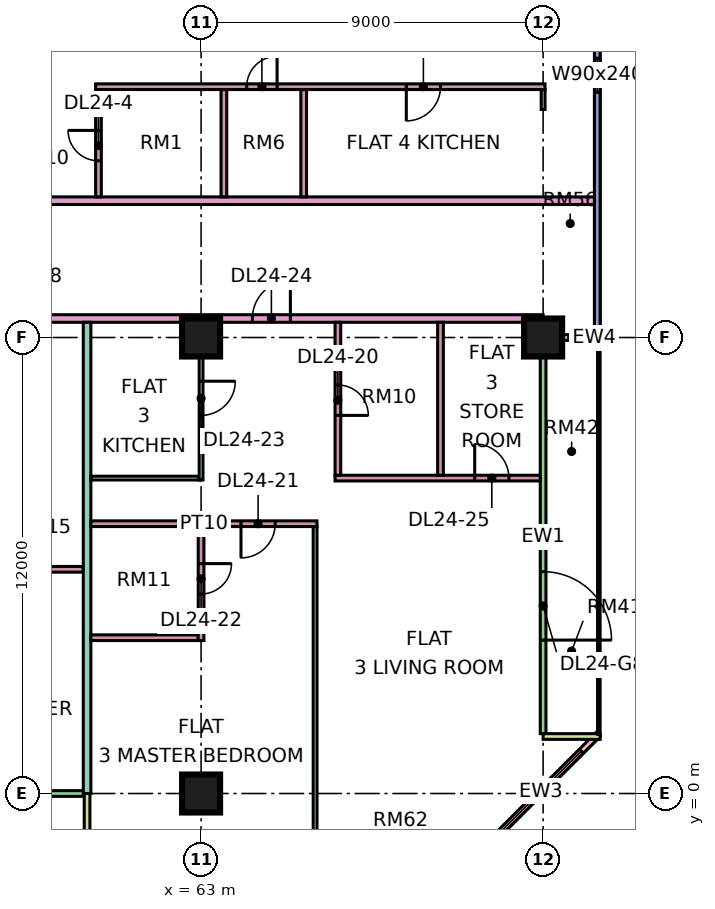
"""IFC4 building model, lengths in metres.
Left out: names, types, materials, properties, quantities, classifications, styles, units other than length and angle.
Written with IfcOpenShell. Run it as: python <this file> out.ifc"""

import sys

from ifc_helpers import new_model, si_unit, direction, frame, frame_2d, origin, origin_2d, place, context, subcontext, project, spatial, rectangle, extrude, element, fill, save


model = new_model("IFC4")
c1 = context("Model", 3, precision=1e-05, world=origin(), true_north=direction((0.0, 1.0)))
c2 = subcontext(c1, "Body", "Model", "MODEL_VIEW")
j1 = project(units=[si_unit("LENGTHUNIT", "METRE"), si_unit("PLANEANGLEUNIT", "RADIAN")], contexts=[c1])
p1 = place(None, origin())
s1 = spatial("IfcSite", under=j1, at=p1, CompositionType="ELEMENT")
p2 = place(p1, origin())
s2 = spatial("IfcBuilding", under=s1, at=p2, CompositionType="ELEMENT")
p3 = place(p2, frame((0.0, 0.0, 106.9)))
s3 = spatial("IfcBuildingStorey", under=s2, at=p3, CompositionType="ELEMENT", Elevation=106.9)
for number, where, z_axis, x_axis in (
    (1, (63.0, 0.0, 0.0), (0.0, 0.0, 1.0), (1.0, 0.0, 0.0)),
    (2, (63.0, 12.0, 0.0), (0.0, 0.0, 1.0), (1.0, 0.0, 0.0)),
    (3, (72.0, 12.0, 0.0), (0.0, 0.0, 1.0), (1.0, 0.0, 0.0)),
):
    element("IfcColumn", number, at=place(p3, frame(where, z_axis=z_axis, x_axis=x_axis)), inside=s3, PredefinedType="COLUMN", context=c2, shape_type="SweptSolid", body=[
        extrude(rectangle(XDim=1.0, YDim=1.0, at=origin_2d()), origin(), (0.0, 0.0, 1.0), 3.75),
    ])
p4 = place(p3, frame((48.075, 0.0, 0.0), z_axis=(0.0, 0.0, 1.0), x_axis=(1.0, 0.0, 0.0)))
e4 = element("IfcWall", 4, at=p4, inside=s3, PredefinedType="SOLIDWALL", context=c2, shape_type="SweptSolid", body=[
    extrude(rectangle(XDim=11.85, YDim=0.15, at=frame_2d((5.925, 0.0))), origin(), (0.0, 0.0, 1.0), 3.35),
])
p5 = place(p4, frame((0.562, 0.0, 0.45)))
e5 = element("IfcOpeningElement", 5, at=p5, cuts=e4, PredefinedType="OPENING", context=c2, shape_type="SweptSolid", body=[
    extrude(rectangle(XDim=1.8, YDim=2.4, at=frame_2d((0.9, 1.2))), frame((0.0, 0.085, 0.0), z_axis=(0.0, -1.0, 0.0), x_axis=(1.0, 0.0, 0.0)), (0.0, 0.0, 1.0), 0.17),
])
p6 = place(p4, frame((3.525, 0.0, 0.0)))
e6 = element("IfcOpeningElement", 6, at=p6, cuts=e4, PredefinedType="OPENING", context=c2, shape_type="SweptSolid", body=[
    extrude(rectangle(XDim=1.2, YDim=2.4, at=frame_2d((0.6, 1.2))), frame((0.0, 0.085, 0.0), z_axis=(0.0, -1.0, 0.0), x_axis=(1.0, 0.0, 0.0)), (0.0, 0.0, 1.0), 0.17),
])
p7 = place(p4, frame((7.688, 0.0, 0.45)))
e7 = element("IfcOpeningElement", 7, at=p7, cuts=e4, PredefinedType="OPENING", context=c2, shape_type="SweptSolid", body=[
    extrude(rectangle(XDim=3.0, YDim=2.4, at=frame_2d((1.5, 1.2))), frame((0.0, 0.085, 0.0), z_axis=(0.0, -1.0, 0.0), x_axis=(1.0, 0.0, 0.0)), (0.0, 0.0, 1.0), 0.17),
])
p8 = place(p3, frame((60.0, -1.5, 0.0), z_axis=(0.0, 0.0, 1.0), x_axis=(0.0, 1.0, 0.0)))
e8 = element("IfcWall", 8, at=p8, inside=s3, PredefinedType="SOLIDWALL", context=c2, shape_type="SweptSolid", body=[
    extrude(rectangle(XDim=1.5, YDim=0.15, at=frame_2d((0.75, 0.0))), origin(), (0.0, 0.0, 1.0), 3.35),
])
p9 = place(p3, frame((70.447, -1.447, 0.0), z_axis=(0.0, 0.0, 1.0), x_axis=(0.707106781187, 0.707106781187, 0.0)))
e9 = element("IfcWall", 9, at=p9, inside=s3, PredefinedType="SOLIDWALL", context=c2, shape_type="SweptSolid", body=[
    extrude(rectangle(XDim=4.243, YDim=0.15, at=frame_2d((2.121, 0.0))), origin(), (0.0, 0.0, 1.0), 3.35),
])
p10 = place(p9, frame((0.621, 0.0, 0.45)))
e10 = element("IfcOpeningElement", 10, at=p10, cuts=e9, PredefinedType="OPENING", context=c2, shape_type="SweptSolid", body=[
    extrude(rectangle(XDim=3.0, YDim=2.4, at=frame_2d((1.5, 1.2))), frame((0.0, 0.085, 0.0), z_axis=(0.0, -1.0, 0.0), x_axis=(1.0, 0.0, 0.0)), (0.0, 0.0, 1.0), 0.17),
])
p11 = place(p3, frame((72.0, 1.575, 0.0), z_axis=(0.0, 0.0, 1.0), x_axis=(0.0, 1.0, 0.0)))
e11 = element("IfcWall", 11, at=p11, inside=s3, PredefinedType="SOLIDWALL", context=c2, shape_type="SweptSolid", body=[
    extrude(rectangle(XDim=10.35, YDim=0.15, at=frame_2d((5.175, 0.0))), origin(), (0.0, 0.0, 1.0), 3.35),
])
p12 = place(p11, frame((2.462, 0.0, 0.0)))
e12 = element("IfcOpeningElement", 12, at=p12, cuts=e11, PredefinedType="OPENING", context=c2, shape_type="SweptSolid", body=[
    extrude(rectangle(XDim=1.8, YDim=2.4, at=frame_2d((0.9, 1.2))), frame((0.0, 0.085, 0.0), z_axis=(0.0, -1.0, 0.0), x_axis=(1.0, 0.0, 0.0)), (0.0, 0.0, 1.0), 0.17),
])
for number, where, z_axis, x_axis in (
    (13, (73.5, 1.5, 0.0), (0.0, 0.0, 1.0), (-1.0, 0.0, 0.0)),
    (14, (73.5, 12.0, 0.0), (0.0, 0.0, 1.0), (-1.0, 0.0, 0.0)),
):
    element("IfcWall", number, at=place(p3, frame(where, z_axis=z_axis, x_axis=x_axis)), inside=s3, PredefinedType="SOLIDWALL", context=c2, shape_type="SweptSolid", body=[
        extrude(rectangle(XDim=1.5, YDim=0.15, at=frame_2d((0.75, 0.0))), origin(), (0.0, 0.0, 1.0), 3.35),
    ])
p13 = place(p3, frame((73.425, 12.075, 0.0), z_axis=(0.0, 0.0, 1.0), x_axis=(0.0, 1.0, 0.0)))
e15 = element("IfcWall", 15, at=p13, inside=s3, PredefinedType="SOLIDWALL", context=c2, shape_type="SweptSolid", body=[
    extrude(rectangle(XDim=10.425, YDim=0.15, at=frame_2d((5.212, 0.0))), origin(), (0.0, 0.0, 1.0), 3.35),
])
p14 = place(p13, frame((6.375, 0.0, 0.45)))
e16 = element("IfcOpeningElement", 16, at=p14, cuts=e15, PredefinedType="OPENING", context=c2, shape_type="SweptSolid", body=[
    extrude(rectangle(XDim=0.9, YDim=2.4, at=frame_2d((0.45, 1.2))), frame((0.0, 0.085, 0.0), z_axis=(0.0, -1.0, 0.0), x_axis=(1.0, 0.0, 0.0)), (0.0, 0.0, 1.0), 0.17),
])
p15 = place(p13, frame((8.175, 0.0, 0.45)))
e17 = element("IfcOpeningElement", 17, at=p15, cuts=e15, PredefinedType="OPENING", context=c2, shape_type="SweptSolid", body=[
    extrude(rectangle(XDim=1.8, YDim=2.4, at=frame_2d((0.9, 1.2))), frame((0.0, 0.085, 0.0), z_axis=(0.0, -1.0, 0.0), x_axis=(1.0, 0.0, 0.0)), (0.0, 0.0, 1.0), 0.17),
])
p16 = place(p3, frame((40.65, 12.5, 0.0), z_axis=(0.0, 0.0, 1.0), x_axis=(1.0, 0.0, 0.0)))
e18 = element("IfcWall", 18, at=p16, inside=s3, PredefinedType="PARTITIONING", context=c2, shape_type="SweptSolid", body=[
    extrude(rectangle(XDim=31.35, YDim=0.2, at=frame_2d((15.675, 0.0))), origin(), (0.0, 0.0, 1.0), 3.35),
])
p17 = place(p16, frame((17.1, 0.0, 0.0)))
e19 = element("IfcOpeningElement", 19, at=p17, cuts=e18, PredefinedType="OPENING", context=c2, shape_type="SweptSolid", body=[
    extrude(rectangle(XDim=1.0, YDim=2.1, at=frame_2d((0.5, 1.05))), frame((0.0, 0.11, 0.0), z_axis=(0.0, -1.0, 0.0), x_axis=(1.0, 0.0, 0.0)), (0.0, 0.0, 1.0), 0.22),
])
p18 = place(p16, frame((23.7, 0.0, 0.0)))
e20 = element("IfcOpeningElement", 20, at=p18, cuts=e18, PredefinedType="OPENING", context=c2, shape_type="SweptSolid", body=[
    extrude(rectangle(XDim=1.0, YDim=2.1, at=frame_2d((0.5, 1.05))), frame((0.0, 0.11, 0.0), z_axis=(0.0, -1.0, 0.0), x_axis=(1.0, 0.0, 0.0)), (0.0, 0.0, 1.0), 0.22),
])
p19 = place(p16, frame((1.05, 0.0, 0.0)))
e21 = element("IfcOpeningElement", 21, at=p19, cuts=e18, PredefinedType="OPENING", context=c2, shape_type="SweptSolid", body=[
    extrude(rectangle(XDim=1.0, YDim=2.1, at=frame_2d((0.5, 1.05))), frame((0.0, 0.11, 0.0), z_axis=(0.0, -1.0, 0.0), x_axis=(1.0, 0.0, 0.0)), (0.0, 0.0, 1.0), 0.22),
])
p20 = place(p3, frame((50.95, 5.9, 0.0), z_axis=(0.0, 0.0, 1.0), x_axis=(1.0, 0.0, 0.0)))
e22 = element("IfcWall", 22, at=p20, inside=s3, PredefinedType="PARTITIONING", context=c2, shape_type="SweptSolid", body=[
    extrude(rectangle(XDim=8.95, YDim=0.15, at=frame_2d((4.475, 0.0))), origin(), (0.0, 0.0, 1.0), 3.35),
])
p21 = place(p20, frame((1.1, 0.0, 0.0)))
e23 = element("IfcOpeningElement", 23, at=p21, cuts=e22, PredefinedType="OPENING", context=c2, shape_type="SweptSolid", body=[
    extrude(rectangle(XDim=0.9, YDim=2.1, at=frame_2d((0.45, 1.05))), frame((0.0, 0.085, 0.0), z_axis=(0.0, -1.0, 0.0), x_axis=(1.0, 0.0, 0.0)), (0.0, 0.0, 1.0), 0.17),
])
p22 = place(p20, frame((7.1, 0.0, 0.0)))
e24 = element("IfcOpeningElement", 24, at=p22, cuts=e22, PredefinedType="OPENING", context=c2, shape_type="SweptSolid", body=[
    extrude(rectangle(XDim=0.9, YDim=2.1, at=frame_2d((0.45, 1.05))), frame((0.0, 0.085, 0.0), z_axis=(0.0, -1.0, 0.0), x_axis=(1.0, 0.0, 0.0)), (0.0, 0.0, 1.0), 0.17),
])
p23 = place(p3, frame((51.225, 15.6, 0.0), z_axis=(0.0, 0.0, 1.0), x_axis=(1.0, 0.0, 0.0)))
e25 = element("IfcWall", 25, at=p23, inside=s3, PredefinedType="PARTITIONING", context=c2, shape_type="SweptSolid", body=[
    extrude(rectangle(XDim=22.125, YDim=0.2, at=frame_2d((11.062, 0.0))), origin(), (0.0, 0.0, 1.0), 3.35),
])
p24 = place(p23, frame((6.725, 0.0, 0.0)))
e26 = element("IfcOpeningElement", 26, at=p24, cuts=e25, PredefinedType="OPENING", context=c2, shape_type="SweptSolid", body=[
    extrude(rectangle(XDim=1.0, YDim=2.1, at=frame_2d((0.5, 1.05))), frame((0.0, 0.11, 0.0), z_axis=(0.0, -1.0, 0.0), x_axis=(1.0, 0.0, 0.0)), (0.0, 0.0, 1.0), 0.22),
])
p25 = place(p23, frame((0.875, 0.0, 0.0)))
e27 = element("IfcOpeningElement", 27, at=p25, cuts=e25, PredefinedType="OPENING", context=c2, shape_type="SweptSolid", body=[
    extrude(rectangle(XDim=1.0, YDim=2.1, at=frame_2d((0.5, 1.05))), frame((0.0, 0.11, 0.0), z_axis=(0.0, -1.0, 0.0), x_axis=(1.0, 0.0, 0.0)), (0.0, 0.0, 1.0), 0.22),
])
p26 = place(p3, frame((60.0, 0.0, 0.0), z_axis=(0.0, 0.0, 1.0), x_axis=(0.0, 1.0, 0.0)))
e28 = element("IfcWall", 28, at=p26, inside=s3, PredefinedType="PARTITIONING", context=c2, shape_type="SweptSolid", body=[
    extrude(rectangle(XDim=12.4, YDim=0.2, at=frame_2d((6.2, 0.0))), origin(), (0.0, 0.0, 1.0), 3.35),
])
p27 = place(p3, frame((60.1, 4.1, 0.0), z_axis=(0.0, 0.0, 1.0), x_axis=(1.0, 0.0, 0.0)))
e29 = element("IfcWall", 29, at=p27, inside=s3, PredefinedType="PARTITIONING", context=c2, shape_type="SweptSolid", body=[
    extrude(rectangle(XDim=2.825, YDim=0.15, at=frame_2d((1.413, 0.0))), origin(), (0.0, 0.0, 1.0), 3.35),
])
p28 = place(p3, frame((60.1, 7.1, 0.0), z_axis=(0.0, 0.0, 1.0), x_axis=(1.0, 0.0, 0.0)))
e30 = element("IfcWall", 30, at=p28, inside=s3, PredefinedType="PARTITIONING", context=c2, shape_type="SweptSolid", body=[
    extrude(rectangle(XDim=5.95, YDim=0.15, at=frame_2d((2.975, 0.0))), origin(), (0.0, 0.0, 1.0), 3.35),
])
p29 = place(p28, frame((3.95, 0.0, 0.0)))
e31 = element("IfcOpeningElement", 31, at=p29, cuts=e30, PredefinedType="OPENING", context=c2, shape_type="SweptSolid", body=[
    extrude(rectangle(XDim=0.9, YDim=2.1, at=frame_2d((0.45, 1.05))), frame((0.0, 0.085, 0.0), z_axis=(0.0, -1.0, 0.0), x_axis=(1.0, 0.0, 0.0)), (0.0, 0.0, 1.0), 0.17),
])
p30 = place(p3, frame((60.1, 8.3, 0.0), z_axis=(0.0, 0.0, 1.0), x_axis=(1.0, 0.0, 0.0)))
e32 = element("IfcWall", 32, at=p30, inside=s3, PredefinedType="PARTITIONING", context=c2, shape_type="SweptSolid", body=[
    extrude(rectangle(XDim=2.85, YDim=0.1, at=frame_2d((1.425, 0.0))), origin(), (0.0, 0.0, 1.0), 3.35),
])
p31 = place(p3, frame((60.225, 18.6, 0.0), z_axis=(0.0, 0.0, 1.0), x_axis=(1.0, 0.0, 0.0)))
e33 = element("IfcWall", 33, at=p31, inside=s3, PredefinedType="PARTITIONING", context=c2, shape_type="SweptSolid", body=[
    extrude(rectangle(XDim=11.825, YDim=0.15, at=frame_2d((5.913, 0.0))), origin(), (0.0, 0.0, 1.0), 3.35),
])
p32 = place(p31, frame((8.175, 0.0, 0.0)))
e34 = element("IfcOpeningElement", 34, at=p32, cuts=e33, PredefinedType="OPENING", context=c2, shape_type="SweptSolid", body=[
    extrude(rectangle(XDim=0.9, YDim=2.1, at=frame_2d((0.45, 1.05))), frame((0.0, 0.085, 0.0), z_axis=(0.0, -1.0, 0.0), x_axis=(1.0, 0.0, 0.0)), (0.0, 0.0, 1.0), 0.17),
])
p33 = place(p31, frame((3.975, 0.0, 0.0)))
e35 = element("IfcOpeningElement", 35, at=p33, cuts=e33, PredefinedType="OPENING", context=c2, shape_type="SweptSolid", body=[
    extrude(rectangle(XDim=0.8, YDim=2.1, at=frame_2d((0.4, 1.05))), frame((0.0, 0.085, 0.0), z_axis=(0.0, -1.0, 0.0), x_axis=(1.0, 0.0, 0.0)), (0.0, 0.0, 1.0), 0.17),
])
p34 = place(p3, frame((60.3, 15.7, 0.0), z_axis=(0.0, 0.0, 1.0), x_axis=(0.0, 1.0, 0.0)))
e36 = element("IfcWall", 36, at=p34, inside=s3, PredefinedType="PARTITIONING", context=c2, shape_type="SweptSolid", body=[
    extrude(rectangle(XDim=2.825, YDim=0.15, at=frame_2d((1.413, 0.0))), origin(), (0.0, 0.0, 1.0), 3.35),
])
p35 = place(p34, frame((0.95, 0.0, 0.0)))
e37 = element("IfcOpeningElement", 37, at=p35, cuts=e36, PredefinedType="OPENING", context=c2, shape_type="SweptSolid", body=[
    extrude(rectangle(XDim=0.8, YDim=2.1, at=frame_2d((0.4, 1.05))), frame((0.0, 0.085, 0.0), z_axis=(0.0, -1.0, 0.0), x_axis=(1.0, 0.0, 0.0)), (0.0, 0.0, 1.0), 0.17),
])
p36 = place(p3, frame((63.0, 4.025, 0.0), z_axis=(0.0, 0.0, 1.0), x_axis=(0.0, 1.0, 0.0)))
e38 = element("IfcWall", 38, at=p36, inside=s3, PredefinedType="PARTITIONING", context=c2, shape_type="SweptSolid", body=[
    extrude(rectangle(XDim=3.0, YDim=0.15, at=frame_2d((1.5, 0.0))), origin(), (0.0, 0.0, 1.0), 3.35),
])
p37 = place(p36, frame((1.225, 0.0, 0.0)))
e39 = element("IfcOpeningElement", 39, at=p37, cuts=e38, PredefinedType="OPENING", context=c2, shape_type="SweptSolid", body=[
    extrude(rectangle(XDim=0.8, YDim=2.1, at=frame_2d((0.4, 1.05))), frame((0.0, 0.085, 0.0), z_axis=(0.0, -1.0, 0.0), x_axis=(1.0, 0.0, 0.0)), (0.0, 0.0, 1.0), 0.17),
])
p38 = place(p3, frame((63.0, 8.25, 0.0), z_axis=(0.0, 0.0, 1.0), x_axis=(0.0, 1.0, 0.0)))
e40 = element("IfcWall", 40, at=p38, inside=s3, PredefinedType="PARTITIONING", context=c2, shape_type="SweptSolid", body=[
    extrude(rectangle(XDim=4.15, YDim=0.1, at=frame_2d((2.075, 0.0))), origin(), (0.0, 0.0, 1.0), 3.35),
])
p39 = place(p38, frame((1.7, 0.0, 0.0)))
e41 = element("IfcOpeningElement", 41, at=p39, cuts=e40, PredefinedType="OPENING", context=c2, shape_type="SweptSolid", body=[
    extrude(rectangle(XDim=0.9, YDim=2.1, at=frame_2d((0.45, 1.05))), frame((0.0, 0.06, 0.0), z_axis=(0.0, -1.0, 0.0), x_axis=(1.0, 0.0, 0.0)), (0.0, 0.0, 1.0), 0.12),
])
for number, where, z_axis, x_axis in (
    (42, (63.6, 15.7, 0.0), (0.0, 0.0, 1.0), (0.0, 1.0, 0.0)),
    (43, (65.7, 15.7, 0.0), (0.0, 0.0, 1.0), (0.0, 1.0, 0.0)),
):
    element("IfcWall", number, at=place(p3, frame(where, z_axis=z_axis, x_axis=x_axis)), inside=s3, PredefinedType="PARTITIONING", context=c2, shape_type="SweptSolid", body=[
        extrude(rectangle(XDim=2.825, YDim=0.15, at=frame_2d((1.413, 0.0))), origin(), (0.0, 0.0, 1.0), 3.35),
    ])
p40 = place(p3, frame((66.0, -1.35, 0.0), z_axis=(0.0, 0.0, 1.0), x_axis=(0.0, 1.0, 0.0)))
e44 = element("IfcWall", 44, at=p40, inside=s3, PredefinedType="PARTITIONING", context=c2, shape_type="SweptSolid", body=[
    extrude(rectangle(XDim=8.375, YDim=0.1, at=frame_2d((4.188, 0.0))), origin(), (0.0, 0.0, 1.0), 3.35),
])
p41 = place(p3, frame((66.525, 8.3, 0.0), z_axis=(0.0, 0.0, 1.0), x_axis=(1.0, 0.0, 0.0)))
e45 = element("IfcWall", 45, at=p41, inside=s3, PredefinedType="PARTITIONING", context=c2, shape_type="SweptSolid", body=[
    extrude(rectangle(XDim=5.401, YDim=0.15, at=frame_2d((2.701, 0.0))), origin(), (0.0, 0.0, 1.0), 3.35),
])
p42 = place(p41, frame((3.675, 0.0, 0.0)))
e46 = element("IfcOpeningElement", 46, at=p42, cuts=e45, PredefinedType="OPENING", context=c2, shape_type="SweptSolid", body=[
    extrude(rectangle(XDim=0.9, YDim=2.1, at=frame_2d((0.45, 1.05))), frame((0.0, 0.085, 0.0), z_axis=(0.0, -1.0, 0.0), x_axis=(1.0, 0.0, 0.0)), (0.0, 0.0, 1.0), 0.17),
])
p43 = place(p3, frame((66.6, 8.375, 0.0), z_axis=(0.0, 0.0, 1.0), x_axis=(0.0, 1.0, 0.0)))
e47 = element("IfcWall", 47, at=p43, inside=s3, PredefinedType="PARTITIONING", context=c2, shape_type="SweptSolid", body=[
    extrude(rectangle(XDim=4.025, YDim=0.15, at=frame_2d((2.012, 0.0))), origin(), (0.0, 0.0, 1.0), 3.35),
])
p44 = place(p43, frame((1.575, 0.0, 0.0)))
e48 = element("IfcOpeningElement", 48, at=p44, cuts=e47, PredefinedType="OPENING", context=c2, shape_type="SweptSolid", body=[
    extrude(rectangle(XDim=0.8, YDim=2.1, at=frame_2d((0.4, 1.05))), frame((0.0, 0.085, 0.0), z_axis=(0.0, -1.0, 0.0), x_axis=(1.0, 0.0, 0.0)), (0.0, 0.0, 1.0), 0.17),
])
p45 = place(p3, frame((69.3, 8.375, 0.0), z_axis=(0.0, 0.0, 1.0), x_axis=(0.0, 1.0, 0.0)))
e49 = element("IfcWall", 49, at=p45, inside=s3, PredefinedType="PARTITIONING", context=c2, shape_type="SweptSolid", body=[
    extrude(rectangle(XDim=4.025, YDim=0.15, at=frame_2d((2.012, 0.0))), origin(), (0.0, 0.0, 1.0), 3.35),
])
p46 = place(p3, frame((72.0, 18.0, 0.0), z_axis=(0.0, 0.0, 1.0), x_axis=(0.0, 1.0, 0.0)))
e50 = element("IfcWall", 50, at=p46, inside=s3, PredefinedType="PARTITIONING", context=c2, shape_type="SweptSolid", body=[
    extrude(rectangle(XDim=0.525, YDim=0.1, at=frame_2d((0.262, 0.0))), origin(), (0.0, 0.0, 1.0), 3.35),
])
p47 = place(p10, origin())
e51 = element("IfcWindow", 51, at=p47, inside=s3, PartitioningType="SINGLE_PANEL", PredefinedType="WINDOW", context=c2, shape_type="SweptSolid", body=[
    extrude(rectangle(XDim=3.0, YDim=2.4, at=frame_2d((1.5, 1.2))), frame((0.0, 0.03, 0.0), z_axis=(0.0, -1.0, 0.0), x_axis=(1.0, 0.0, 0.0)), (0.0, 0.0, 1.0), 0.06),
])
fill(e10, e51)
p48 = place(p12, frame((1.8, 0.0, 0.0), z_axis=(0.0, 0.0, 1.0), x_axis=(-1.0, 0.0, 0.0)))
e52 = element("IfcDoor", 52, at=p48, inside=s3, OperationType="DOUBLE_DOOR_SINGLE_SWING", PredefinedType="DOOR", context=c2, shape_type="SweptSolid", body=[
    extrude(rectangle(XDim=1.8, YDim=2.4, at=frame_2d((0.9, 1.2))), frame((0.0, 0.025, 0.0), z_axis=(0.0, -1.0, 0.0), x_axis=(1.0, 0.0, 0.0)), (0.0, 0.0, 1.0), 0.05),
])
fill(e12, e52)
p49 = place(p14, origin())
e53 = element("IfcWindow", 53, at=p49, inside=s3, PartitioningType="SINGLE_PANEL", PredefinedType="WINDOW", context=c2, shape_type="SweptSolid", body=[
    extrude(rectangle(XDim=0.9, YDim=2.4, at=frame_2d((0.45, 1.2))), frame((0.0, 0.03, 0.0), z_axis=(0.0, -1.0, 0.0), x_axis=(1.0, 0.0, 0.0)), (0.0, 0.0, 1.0), 0.06),
])
fill(e16, e53)
p50 = place(p35, frame((0.8, 0.0, 0.0), z_axis=(0.0, 0.0, 1.0), x_axis=(-1.0, 0.0, 0.0)))
e54 = element("IfcDoor", 54, at=p50, inside=s3, OperationType="SINGLE_SWING_RIGHT", PredefinedType="DOOR", context=c2, shape_type="SweptSolid", body=[
    extrude(rectangle(XDim=0.8, YDim=2.1, at=frame_2d((0.4, 1.05))), frame((0.0, 0.025, 0.0), z_axis=(0.0, -1.0, 0.0), x_axis=(1.0, 0.0, 0.0)), (0.0, 0.0, 1.0), 0.05),
])
fill(e37, e54)
p51 = place(p32, frame((0.9, 0.0, 0.0), z_axis=(0.0, 0.0, 1.0), x_axis=(-1.0, 0.0, 0.0)))
e55 = element("IfcDoor", 55, at=p51, inside=s3, OperationType="SINGLE_SWING_LEFT", PredefinedType="DOOR", context=c2, shape_type="SweptSolid", body=[
    extrude(rectangle(XDim=0.9, YDim=2.1, at=frame_2d((0.45, 1.05))), frame((0.0, 0.025, 0.0), z_axis=(0.0, -1.0, 0.0), x_axis=(1.0, 0.0, 0.0)), (0.0, 0.0, 1.0), 0.05),
])
fill(e34, e55)
p52 = place(p33, frame((0.8, 0.0, 0.0), z_axis=(0.0, 0.0, 1.0), x_axis=(-1.0, 0.0, 0.0)))
e56 = element("IfcDoor", 56, at=p52, inside=s3, OperationType="SINGLE_SWING_RIGHT", PredefinedType="DOOR", context=c2, shape_type="SweptSolid", body=[
    extrude(rectangle(XDim=0.8, YDim=2.1, at=frame_2d((0.4, 1.05))), frame((0.0, 0.025, 0.0), z_axis=(0.0, -1.0, 0.0), x_axis=(1.0, 0.0, 0.0)), (0.0, 0.0, 1.0), 0.05),
])
fill(e35, e56)
p53 = place(p44, frame((0.8, 0.0, 0.0), z_axis=(0.0, 0.0, 1.0), x_axis=(-1.0, 0.0, 0.0)))
e57 = element("IfcDoor", 57, at=p53, inside=s3, OperationType="SINGLE_SWING_LEFT", PredefinedType="DOOR", context=c2, shape_type="SweptSolid", body=[
    extrude(rectangle(XDim=0.8, YDim=2.1, at=frame_2d((0.4, 1.05))), frame((0.0, 0.025, 0.0), z_axis=(0.0, -1.0, 0.0), x_axis=(1.0, 0.0, 0.0)), (0.0, 0.0, 1.0), 0.05),
])
fill(e48, e57)
p54 = place(p29, frame((0.9, 0.0, 0.0), z_axis=(0.0, 0.0, 1.0), x_axis=(-1.0, 0.0, 0.0)))
e58 = element("IfcDoor", 58, at=p54, inside=s3, OperationType="SINGLE_SWING_LEFT", PredefinedType="DOOR", context=c2, shape_type="SweptSolid", body=[
    extrude(rectangle(XDim=0.9, YDim=2.1, at=frame_2d((0.45, 1.05))), frame((0.0, 0.025, 0.0), z_axis=(0.0, -1.0, 0.0), x_axis=(1.0, 0.0, 0.0)), (0.0, 0.0, 1.0), 0.05),
])
fill(e31, e58)
p55 = place(p37, origin())
e59 = element("IfcDoor", 59, at=p55, inside=s3, OperationType="SINGLE_SWING_RIGHT", PredefinedType="DOOR", context=c2, shape_type="SweptSolid", body=[
    extrude(rectangle(XDim=0.8, YDim=2.1, at=frame_2d((0.4, 1.05))), frame((0.0, 0.025, 0.0), z_axis=(0.0, -1.0, 0.0), x_axis=(1.0, 0.0, 0.0)), (0.0, 0.0, 1.0), 0.05),
])
fill(e39, e59)
p56 = place(p39, origin())
e60 = element("IfcDoor", 60, at=p56, inside=s3, OperationType="SINGLE_SWING_RIGHT", PredefinedType="DOOR", context=c2, shape_type="SweptSolid", body=[
    extrude(rectangle(XDim=0.9, YDim=2.1, at=frame_2d((0.45, 1.05))), frame((0.0, 0.025, 0.0), z_axis=(0.0, -1.0, 0.0), x_axis=(1.0, 0.0, 0.0)), (0.0, 0.0, 1.0), 0.05),
])
fill(e41, e60)
p57 = place(p18, frame((1.0, 0.0, 0.0), z_axis=(0.0, 0.0, 1.0), x_axis=(-1.0, 0.0, 0.0)))
e61 = element("IfcDoor", 61, at=p57, inside=s3, OperationType="SINGLE_SWING_RIGHT", PredefinedType="DOOR", context=c2, shape_type="SweptSolid", body=[
    extrude(rectangle(XDim=1.0, YDim=2.1, at=frame_2d((0.5, 1.05))), frame((0.0, 0.025, 0.0), z_axis=(0.0, -1.0, 0.0), x_axis=(1.0, 0.0, 0.0)), (0.0, 0.0, 1.0), 0.05),
])
fill(e20, e61)
p58 = place(p42, origin())
e62 = element("IfcDoor", 62, at=p58, inside=s3, OperationType="SINGLE_SWING_LEFT", PredefinedType="DOOR", context=c2, shape_type="SweptSolid", body=[
    extrude(rectangle(XDim=0.9, YDim=2.1, at=frame_2d((0.45, 1.05))), frame((0.0, 0.025, 0.0), z_axis=(0.0, -1.0, 0.0), x_axis=(1.0, 0.0, 0.0)), (0.0, 0.0, 1.0), 0.05),
])
fill(e46, e62)
save(model, sys.argv[1])
